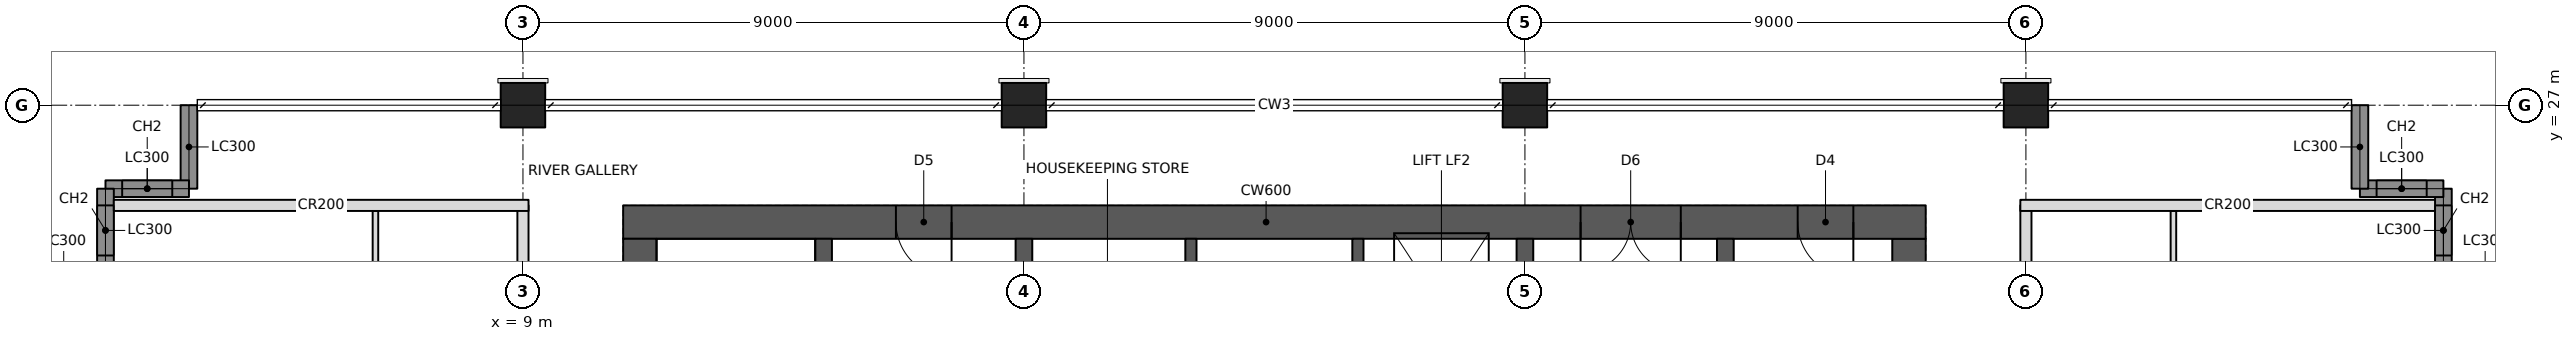
"""IFC4 building model, lengths in metres.
Left out: names, types, materials, properties, quantities, classifications, styles, units other than length and angle.
Written with IfcOpenShell. Run it as: python <this file> out.ifc"""

import sys

from ifc_helpers import new_model, si_unit, direction, frame, frame_2d, origin, origin_2d, place, context, subcontext, project, spatial, rectangle, hollow_rectangle, extrude, element, fill, save


model = new_model("IFC4")
c1 = context("Model", 3, precision=1e-05, world=origin(), true_north=direction((0.0, 1.0)))
c2 = subcontext(c1, "Body", "Model", "MODEL_VIEW")
j1 = project(units=[si_unit("LENGTHUNIT", "METRE"), si_unit("PLANEANGLEUNIT", "RADIAN")], contexts=[c1])
p1 = place(None, origin())
s1 = spatial("IfcSite", under=j1, at=p1, CompositionType="ELEMENT")
p2 = place(p1, origin())
s2 = spatial("IfcBuilding", under=s1, at=p2, CompositionType="ELEMENT")
p3 = place(p2, frame((0.0, 0.0, 180.8)))
s3 = spatial("IfcBuildingStorey", under=s2, at=p3, CompositionType="ELEMENT", Elevation=180.8)
for number, where, z_axis, x_axis in (
    (1, (9.0, 27.0, 0.0), (0.0, 0.0, 1.0), (1.0, 0.0, 0.0)),
    (2, (18.0, 27.0, 0.0), (0.0, 0.0, 1.0), (1.0, 0.0, 0.0)),
    (3, (27.0, 27.0, 0.0), (0.0, 0.0, 1.0), (1.0, 0.0, 0.0)),
    (4, (36.0, 27.0, 0.0), (0.0, 0.0, 1.0), (1.0, 0.0, 0.0)),
):
    element("IfcColumn", number, at=place(p3, frame(where, z_axis=z_axis, x_axis=x_axis)), inside=s3, PredefinedType="COLUMN", context=c2, shape_type="SweptSolid", body=[
        extrude(hollow_rectangle(XDim=0.8, YDim=0.8, WallThickness=0.07, at=origin_2d()), origin(), (0.0, 0.0, 1.0), 3.4),
    ])
p4 = place(p3, frame((10.8, 24.9, 0.0), z_axis=(0.0, 0.0, 1.0), x_axis=(1.0, 0.0, 0.0)))
e5 = element("IfcWall", 5, at=p4, inside=s3, PredefinedType="SHEAR", context=c2, shape_type="SweptSolid", body=[
    extrude(rectangle(XDim=23.4, YDim=0.6, at=frame_2d((11.7, 0.0))), origin(), (0.0, 0.0, 1.0), 3.4),
])
p5 = place(p4, frame((17.2, 0.0, 0.0)))
e6 = element("IfcOpeningElement", 6, at=p5, cuts=e5, PredefinedType="OPENING", context=c2, shape_type="SweptSolid", body=[
    extrude(rectangle(XDim=1.8, YDim=2.1, at=frame_2d((0.9, 1.05))), frame((0.0, 0.31, 0.0), z_axis=(0.0, -1.0, 0.0), x_axis=(1.0, 0.0, 0.0)), (0.0, 0.0, 1.0), 0.62),
])
p6 = place(p4, frame((21.1, 0.0, 0.0)))
e7 = element("IfcOpeningElement", 7, at=p6, cuts=e5, PredefinedType="OPENING", context=c2, shape_type="SweptSolid", body=[
    extrude(rectangle(XDim=1.0, YDim=2.1, at=frame_2d((0.5, 1.05))), frame((0.0, 0.31, 0.0), z_axis=(0.0, -1.0, 0.0), x_axis=(1.0, 0.0, 0.0)), (0.0, 0.0, 1.0), 0.62),
])
p7 = place(p4, frame((4.9, 0.0, 0.0)))
e8 = element("IfcOpeningElement", 8, at=p7, cuts=e5, PredefinedType="OPENING", context=c2, shape_type="SweptSolid", body=[
    extrude(rectangle(XDim=1.0, YDim=2.1, at=frame_2d((0.5, 1.05))), frame((0.0, 0.31, 0.0), z_axis=(0.0, -1.0, 0.0), x_axis=(1.0, 0.0, 0.0)), (0.0, 0.0, 1.0), 0.62),
])
for number, where, z_axis, x_axis in (
    (9, (11.1, 11.4, 0.0), (0.0, 0.0, 1.0), (0.0, 1.0, 0.0)),
    (10, (33.9, 11.4, 0.0), (0.0, 0.0, 1.0), (0.0, 1.0, 0.0)),
):
    element("IfcWall", number, at=place(p3, frame(where, z_axis=z_axis, x_axis=x_axis)), inside=s3, PredefinedType="SHEAR", context=c2, shape_type="SweptSolid", body=[
        extrude(rectangle(XDim=13.2, YDim=0.6, at=frame_2d((6.6, 0.0))), origin(), (0.0, 0.0, 1.0), 3.4),
    ])
p8 = place(p3, frame((14.4, 11.4, 0.0), z_axis=(0.0, 0.0, 1.0), x_axis=(0.0, 1.0, 0.0)))
e11 = element("IfcWall", 11, at=p8, inside=s3, PredefinedType="SHEAR", context=c2, shape_type="SweptSolid", body=[
    extrude(rectangle(XDim=13.2, YDim=0.3, at=frame_2d((6.6, 0.0))), origin(), (0.0, 0.0, 1.0), 3.4),
])
p9 = place(p3, frame((18.0, 11.4, 0.0), z_axis=(0.0, 0.0, 1.0), x_axis=(0.0, 1.0, 0.0)))
e12 = element("IfcWall", 12, at=p9, inside=s3, PredefinedType="SHEAR", context=c2, shape_type="SweptSolid", body=[
    extrude(rectangle(XDim=13.2, YDim=0.3, at=frame_2d((6.6, 0.0))), origin(), (0.0, 0.0, 1.0), 3.4),
])
p10 = place(p9, frame((3.6, 0.0, 0.0)))
e13 = element("IfcOpeningElement", 13, at=p10, cuts=e12, PredefinedType="OPENING", context=c2, shape_type="SweptSolid", body=[
    extrude(rectangle(XDim=1.0, YDim=2.1, at=frame_2d((0.5, 1.05))), frame((0.0, 0.16, 0.0), z_axis=(0.0, -1.0, 0.0), x_axis=(1.0, 0.0, 0.0)), (0.0, 0.0, 1.0), 0.32),
])
p11 = place(p9, frame((7.85, 0.0, 0.0)))
e14 = element("IfcOpeningElement", 14, at=p11, cuts=e12, PredefinedType="OPENING", context=c2, shape_type="SweptSolid", body=[
    extrude(rectangle(XDim=1.1, YDim=2.1, at=frame_2d((0.55, 1.05))), frame((0.0, 0.16, 0.0), z_axis=(0.0, -1.0, 0.0), x_axis=(1.0, 0.0, 0.0)), (0.0, 0.0, 1.0), 0.32),
])
p12 = place(p3, frame((27.0, 21.75, 0.0), z_axis=(0.0, 0.0, 1.0), x_axis=(0.0, 1.0, 0.0)))
e15 = element("IfcWall", 15, at=p12, inside=s3, PredefinedType="SHEAR", context=c2, shape_type="SweptSolid", body=[
    extrude(rectangle(XDim=2.85, YDim=0.3, at=frame_2d((1.425, 0.0))), origin(), (0.0, 0.0, 1.0), 3.4),
])
for number, where, z_axis, x_axis in (
    (16, (21.0, 21.75, 0.0), (0.0, 0.0, 1.0), (0.0, 1.0, 0.0)),
    (17, (24.0, 21.75, 0.0), (0.0, 0.0, 1.0), (0.0, 1.0, 0.0)),
):
    element("IfcWall", number, at=place(p3, frame(where, z_axis=z_axis, x_axis=x_axis)), inside=s3, PredefinedType="SHEAR", context=c2, shape_type="SweptSolid", body=[
        extrude(rectangle(XDim=2.85, YDim=0.2, at=frame_2d((1.425, 0.0))), origin(), (0.0, 0.0, 1.0), 3.4),
    ])
p13 = place(p3, frame((30.6, 11.4, 0.0), z_axis=(0.0, 0.0, 1.0), x_axis=(0.0, 1.0, 0.0)))
e18 = element("IfcWall", 18, at=p13, inside=s3, PredefinedType="SHEAR", context=c2, shape_type="SweptSolid", body=[
    extrude(rectangle(XDim=13.2, YDim=0.3, at=frame_2d((6.6, 0.0))), origin(), (0.0, 0.0, 1.0), 3.4),
])
p14 = place(p3, frame((43.5, 24.0, 0.0), z_axis=(0.0, 0.0, 1.0), x_axis=(0.0, 1.0, 0.0)))
e19 = element("IfcWall", 19, at=p14, inside=s3, PredefinedType="SOLIDWALL", context=c2, shape_type="SweptSolid", body=[
    extrude(rectangle(XDim=1.5, YDim=0.3, at=frame_2d((0.75, 0.0))), origin(), (0.0, 0.0, 1.0), 3.2),
])
p15 = place(p14, frame((0.3, 0.0, 0.6)))
e20 = element("IfcOpeningElement", 20, at=p15, cuts=e19, PredefinedType="OPENING", context=c2, shape_type="SweptSolid", body=[
    extrude(rectangle(XDim=0.9, YDim=2.2, at=frame_2d((0.45, 1.1))), frame((0.0, 0.16, 0.0), z_axis=(0.0, -1.0, 0.0), x_axis=(1.0, 0.0, 0.0)), (0.0, 0.0, 1.0), 0.32),
])
p16 = place(p3, frame((43.5, 25.5, 0.0), z_axis=(0.0, 0.0, 1.0), x_axis=(-1.0, 0.0, 0.0)))
e21 = element("IfcWall", 21, at=p16, inside=s3, PredefinedType="SOLIDWALL", context=c2, shape_type="SweptSolid", body=[
    extrude(rectangle(XDim=1.5, YDim=0.3, at=frame_2d((0.75, 0.0))), origin(), (0.0, 0.0, 1.0), 3.2),
])
p17 = place(p16, frame((0.3, 0.0, 0.6)))
e22 = element("IfcOpeningElement", 22, at=p17, cuts=e21, PredefinedType="OPENING", context=c2, shape_type="SweptSolid", body=[
    extrude(rectangle(XDim=0.9, YDim=2.2, at=frame_2d((0.45, 1.1))), frame((0.0, 0.16, 0.0), z_axis=(0.0, -1.0, 0.0), x_axis=(1.0, 0.0, 0.0)), (0.0, 0.0, 1.0), 0.32),
])
for number, where, z_axis, x_axis in (
    (23, (42.0, 25.5, 0.0), (0.0, 0.0, 1.0), (0.0, 1.0, 0.0)),
    (24, (3.0, 27.0, 0.0), (0.0, 0.0, 1.0), (0.0, -1.0, 0.0)),
):
    element("IfcWall", number, at=place(p3, frame(where, z_axis=z_axis, x_axis=x_axis)), inside=s3, PredefinedType="SOLIDWALL", context=c2, shape_type="SweptSolid", body=[
        extrude(rectangle(XDim=1.5, YDim=0.3, at=frame_2d((0.75, 0.0))), origin(), (0.0, 0.0, 1.0), 2.42),
    ])
p18 = place(p3, frame((3.0, 25.5, 0.0), z_axis=(0.0, 0.0, 1.0), x_axis=(-1.0, 0.0, 0.0)))
e25 = element("IfcWall", 25, at=p18, inside=s3, PredefinedType="SOLIDWALL", context=c2, shape_type="SweptSolid", body=[
    extrude(rectangle(XDim=1.5, YDim=0.3, at=frame_2d((0.75, 0.0))), origin(), (0.0, 0.0, 1.0), 3.2),
])
p19 = place(p18, frame((0.3, 0.0, 0.6)))
e26 = element("IfcOpeningElement", 26, at=p19, cuts=e25, PredefinedType="OPENING", context=c2, shape_type="SweptSolid", body=[
    extrude(rectangle(XDim=0.9, YDim=2.2, at=frame_2d((0.45, 1.1))), frame((0.0, 0.16, 0.0), z_axis=(0.0, -1.0, 0.0), x_axis=(1.0, 0.0, 0.0)), (0.0, 0.0, 1.0), 0.32),
])
p20 = place(p3, frame((1.5, 25.5, 0.0), z_axis=(0.0, 0.0, 1.0), x_axis=(0.0, -1.0, 0.0)))
e27 = element("IfcWall", 27, at=p20, inside=s3, PredefinedType="SOLIDWALL", context=c2, shape_type="SweptSolid", body=[
    extrude(rectangle(XDim=1.5, YDim=0.3, at=frame_2d((0.75, 0.0))), origin(), (0.0, 0.0, 1.0), 3.2),
])
p21 = place(p20, frame((0.3, 0.0, 0.6)))
e28 = element("IfcOpeningElement", 28, at=p21, cuts=e27, PredefinedType="OPENING", context=c2, shape_type="SweptSolid", body=[
    extrude(rectangle(XDim=0.9, YDim=2.2, at=frame_2d((0.45, 1.1))), frame((0.0, 0.16, 0.0), z_axis=(0.0, -1.0, 0.0), x_axis=(1.0, 0.0, 0.0)), (0.0, 0.0, 1.0), 0.32),
])
p22 = place(p3, frame((9.0, 18.4, 0.0), z_axis=(0.0, 0.0, 1.0), x_axis=(0.0, 1.0, 0.0)))
e29 = element("IfcWall", 29, at=p22, inside=s3, PredefinedType="PARTITIONING", context=c2, shape_type="SweptSolid", body=[
    extrude(rectangle(XDim=6.8, YDim=0.2, at=frame_2d((3.4, 0.0))), origin(), (0.0, 0.0, 1.0), 2.405),
])
p23 = place(p3, frame((1.65, 25.2, 0.0), z_axis=(0.0, 0.0, 1.0), x_axis=(1.0, 0.0, 0.0)))
e30 = element("IfcWall", 30, at=p23, inside=s3, PredefinedType="PARTITIONING", context=c2, shape_type="SweptSolid", body=[
    extrude(rectangle(XDim=7.45, YDim=0.2, at=frame_2d((3.725, 0.0))), origin(), (0.0, 0.0, 1.0), 2.404),
])
p24 = place(p3, frame((36.0, 18.4, 0.0), z_axis=(0.0, 0.0, 1.0), x_axis=(0.0, 1.0, 0.0)))
e31 = element("IfcWall", 31, at=p24, inside=s3, PredefinedType="PARTITIONING", context=c2, shape_type="SweptSolid", body=[
    extrude(rectangle(XDim=6.8, YDim=0.2, at=frame_2d((3.4, 0.0))), origin(), (0.0, 0.0, 1.0), 2.405),
])
p25 = place(p3, frame((35.9, 25.2, 0.0), z_axis=(0.0, 0.0, 1.0), x_axis=(1.0, 0.0, 0.0)))
e32 = element("IfcWall", 32, at=p25, inside=s3, PredefinedType="PARTITIONING", context=c2, shape_type="SweptSolid", body=[
    extrude(rectangle(XDim=7.45, YDim=0.2, at=frame_2d((3.725, 0.0))), origin(), (0.0, 0.0, 1.0), 2.404),
])
for number, where, z_axis, x_axis in (
    (33, (6.35, 21.65, 0.0), (0.0, 0.0, 1.0), (0.0, 1.0, 0.0)),
    (34, (38.65, 21.65, 0.0), (0.0, 0.0, 1.0), (0.0, 1.0, 0.0)),
):
    element("IfcWall", number, at=place(p3, frame(where, z_axis=z_axis, x_axis=x_axis)), inside=s3, PredefinedType="PARTITIONING", context=c2, shape_type="SweptSolid", body=[
        extrude(rectangle(XDim=3.45, YDim=0.1, at=frame_2d((1.725, 0.0))), origin(), (0.0, 0.0, 1.0), 3.2),
    ])
p26 = place(p15, origin())
e35 = element("IfcWindow", 35, at=p26, inside=s3, PartitioningType="SINGLE_PANEL", PredefinedType="WINDOW", context=c2, shape_type="SweptSolid", body=[
    extrude(rectangle(XDim=0.9, YDim=2.2, at=frame_2d((0.45, 1.1))), frame((0.0, 0.03, 0.0), z_axis=(0.0, -1.0, 0.0), x_axis=(1.0, 0.0, 0.0)), (0.0, 0.0, 1.0), 0.06),
])
fill(e20, e35)
p27 = place(p17, origin())
e36 = element("IfcWindow", 36, at=p27, inside=s3, PartitioningType="SINGLE_PANEL", PredefinedType="WINDOW", context=c2, shape_type="SweptSolid", body=[
    extrude(rectangle(XDim=0.9, YDim=2.2, at=frame_2d((0.45, 1.1))), frame((0.0, 0.03, 0.0), z_axis=(0.0, -1.0, 0.0), x_axis=(1.0, 0.0, 0.0)), (0.0, 0.0, 1.0), 0.06),
])
fill(e22, e36)
p28 = place(p19, origin())
e37 = element("IfcWindow", 37, at=p28, inside=s3, PartitioningType="SINGLE_PANEL", PredefinedType="WINDOW", context=c2, shape_type="SweptSolid", body=[
    extrude(rectangle(XDim=0.9, YDim=2.2, at=frame_2d((0.45, 1.1))), frame((0.0, 0.03, 0.0), z_axis=(0.0, -1.0, 0.0), x_axis=(1.0, 0.0, 0.0)), (0.0, 0.0, 1.0), 0.06),
])
fill(e26, e37)
p29 = place(p21, origin())
e38 = element("IfcWindow", 38, at=p29, inside=s3, PartitioningType="SINGLE_PANEL", PredefinedType="WINDOW", context=c2, shape_type="SweptSolid", body=[
    extrude(rectangle(XDim=0.9, YDim=2.2, at=frame_2d((0.45, 1.1))), frame((0.0, 0.03, 0.0), z_axis=(0.0, -1.0, 0.0), x_axis=(1.0, 0.0, 0.0)), (0.0, 0.0, 1.0), 0.06),
])
fill(e28, e38)
p30 = place(p5, frame((1.8, 0.0, 0.0), z_axis=(0.0, 0.0, 1.0), x_axis=(-1.0, 0.0, 0.0)))
e39 = element("IfcDoor", 39, at=p30, inside=s3, OperationType="DOUBLE_DOOR_SINGLE_SWING", PredefinedType="DOOR", context=c2, shape_type="SweptSolid", body=[
    extrude(rectangle(XDim=1.8, YDim=2.1, at=frame_2d((0.9, 1.05))), frame((0.0, 0.025, 0.0), z_axis=(0.0, -1.0, 0.0), x_axis=(1.0, 0.0, 0.0)), (0.0, 0.0, 1.0), 0.05),
])
fill(e6, e39)
p31 = place(p6, frame((1.0, 0.0, 0.0), z_axis=(0.0, 0.0, 1.0), x_axis=(-1.0, 0.0, 0.0)))
e40 = element("IfcDoor", 40, at=p31, inside=s3, OperationType="SINGLE_SWING_LEFT", PredefinedType="DOOR", context=c2, shape_type="SweptSolid", body=[
    extrude(rectangle(XDim=1.0, YDim=2.1, at=frame_2d((0.5, 1.05))), frame((0.0, 0.025, 0.0), z_axis=(0.0, -1.0, 0.0), x_axis=(1.0, 0.0, 0.0)), (0.0, 0.0, 1.0), 0.05),
])
fill(e7, e40)
p32 = place(p7, frame((1.0, 0.0, 0.0), z_axis=(0.0, 0.0, 1.0), x_axis=(-1.0, 0.0, 0.0)))
e41 = element("IfcDoor", 41, at=p32, inside=s3, OperationType="SINGLE_SWING_LEFT", PredefinedType="DOOR", context=c2, shape_type="SweptSolid", body=[
    extrude(rectangle(XDim=1.0, YDim=2.1, at=frame_2d((0.5, 1.05))), frame((0.0, 0.025, 0.0), z_axis=(0.0, -1.0, 0.0), x_axis=(1.0, 0.0, 0.0)), (0.0, 0.0, 1.0), 0.05),
])
fill(e8, e41)
save(model, sys.argv[1])
